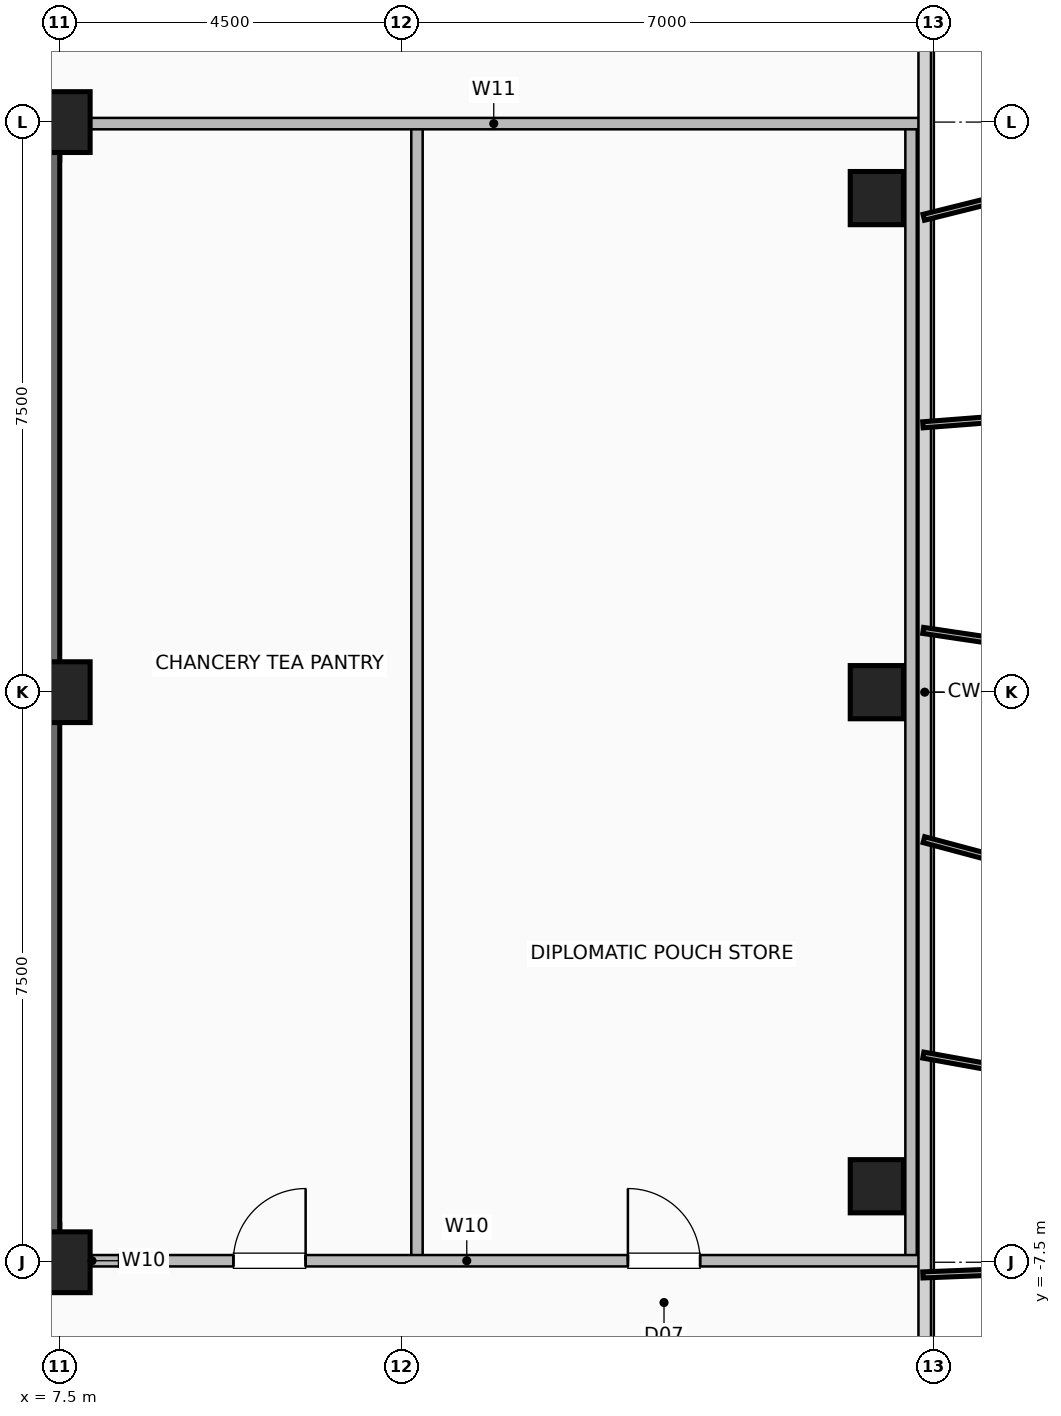
"""IFC4 building model, lengths in metres.
Left out: names, types, materials, properties, quantities, classifications, styles, units other than length and angle.
Written with IfcOpenShell. Run it as: python <this file> out.ifc"""

import sys

from ifc_helpers import new_model, si_unit, direction, frame, frame_2d, origin, origin_2d, place, context, subcontext, project, spatial, rectangle, hollow_rectangle, extrude, element, fill, save


model = new_model("IFC4")
c1 = context("Model", 3, precision=1e-05, world=origin(), true_north=direction((0.0, 1.0)))
c2 = subcontext(c1, "Body", "Model", "MODEL_VIEW")
j1 = project(units=[si_unit("LENGTHUNIT", "METRE"), si_unit("PLANEANGLEUNIT", "RADIAN")], contexts=[c1])
p1 = place(None, origin())
s1 = spatial("IfcSite", under=j1, at=p1, CompositionType="ELEMENT")
p2 = place(p1, origin())
s2 = spatial("IfcBuilding", under=s1, at=p2, CompositionType="ELEMENT")
p3 = place(p2, frame((0.0, 0.0, 239.6)))
s3 = spatial("IfcBuildingStorey", under=s2, at=p3, CompositionType="ELEMENT", Elevation=239.6)
for number, where, z_axis, x_axis in (
    (1, (7.5, -7.5, 0.0), (0.0, 0.0, 1.0), (1.0, 0.0, 0.0)),
    (2, (7.5, 0.0, 0.0), (0.0, 0.0, 1.0), (1.0, 0.0, 0.0)),
    (3, (7.5, 7.5, 0.0), (0.0, 0.0, 1.0), (1.0, 0.0, 0.0)),
):
    element("IfcColumn", number, at=place(p3, frame(where, z_axis=z_axis, x_axis=x_axis)), inside=s3, PredefinedType="COLUMN", context=c2, shape_type="SweptSolid", body=[
        extrude(hollow_rectangle(XDim=0.8, YDim=0.8, WallThickness=0.04, at=origin_2d()), origin(), (0.0, 0.0, 1.0), 3.6),
    ])
for number, where, z_axis, x_axis in (
    (4, (18.25, -6.5, 0.0), (0.0, 0.0, 1.0), (1.0, 0.0, 0.0)),
    (5, (18.25, 0.0, 0.0), (0.0, 0.0, 1.0), (1.0, 0.0, 0.0)),
    (6, (18.25, 6.5, 0.0), (0.0, 0.0, 1.0), (1.0, 0.0, 0.0)),
):
    element("IfcColumn", number, at=place(p3, frame(where, z_axis=z_axis, x_axis=x_axis)), inside=s3, PredefinedType="COLUMN", context=c2, shape_type="SweptSolid", body=[
        extrude(hollow_rectangle(XDim=0.7, YDim=0.7, WallThickness=0.035, at=origin_2d()), origin(), (0.0, 0.0, 1.0), 3.6),
    ])
p4 = place(p3, frame((-7.5, -7.25, 0.0), z_axis=(0.0, 0.0, 1.0), x_axis=(1.0, 0.0, 0.0)))
e7 = element("IfcWall", 7, at=p4, inside=s3, PredefinedType="SHEAR", context=c2, shape_type="SweptSolid", body=[
    extrude(rectangle(XDim=15.0, YDim=0.5, at=frame_2d((7.5, 0.0))), origin(), (0.0, 0.0, 1.0), 3.36),
])
p5 = place(p4, frame((1.55, 0.0, 0.0)))
e8 = element("IfcOpeningElement", 8, at=p5, cuts=e7, PredefinedType="OPENING", context=c2, shape_type="SweptSolid", body=[
    extrude(rectangle(XDim=1.05, YDim=2.08, at=frame_2d((0.525, 1.04))), frame((0.0, 0.26, 0.0), z_axis=(0.0, -1.0, 0.0), x_axis=(1.0, 0.0, 0.0)), (0.0, 0.0, 1.0), 0.52),
])
p6 = place(p4, frame((12.4, 0.0, 0.0)))
e9 = element("IfcOpeningElement", 9, at=p6, cuts=e7, PredefinedType="OPENING", context=c2, shape_type="SweptSolid", body=[
    extrude(rectangle(XDim=1.05, YDim=2.08, at=frame_2d((0.525, 1.04))), frame((0.0, 0.26, 0.0), z_axis=(0.0, -1.0, 0.0), x_axis=(1.0, 0.0, 0.0)), (0.0, 0.0, 1.0), 0.52),
])
p7 = place(p4, frame((5.2, 0.0, 0.0)))
e10 = element("IfcOpeningElement", 10, at=p7, cuts=e7, PredefinedType="OPENING", context=c2, shape_type="SweptSolid", body=[
    extrude(rectangle(XDim=1.0, YDim=2.08, at=frame_2d((0.5, 1.04))), frame((0.0, 0.26, 0.0), z_axis=(0.0, -1.0, 0.0), x_axis=(1.0, 0.0, 0.0)), (0.0, 0.0, 1.0), 0.52),
])
p8 = place(p4, frame((8.65, 0.0, 0.0)))
e11 = element("IfcOpeningElement", 11, at=p8, cuts=e7, PredefinedType="OPENING", context=c2, shape_type="SweptSolid", body=[
    extrude(rectangle(XDim=1.0, YDim=2.08, at=frame_2d((0.5, 1.04))), frame((0.0, 0.26, 0.0), z_axis=(0.0, -1.0, 0.0), x_axis=(1.0, 0.0, 0.0)), (0.0, 0.0, 1.0), 0.52),
])
for number, where, z_axis, x_axis in (
    (12, (-7.5, 7.25, 0.0), (0.0, 0.0, 1.0), (1.0, 0.0, 0.0)),
    (13, (7.25, -7.5, 0.0), (0.0, 0.0, 1.0), (0.0, 1.0, 0.0)),
):
    element("IfcWall", number, at=place(p3, frame(where, z_axis=z_axis, x_axis=x_axis)), inside=s3, PredefinedType="SHEAR", context=c2, shape_type="SweptSolid", body=[
        extrude(rectangle(XDim=15.0, YDim=0.5, at=frame_2d((7.5, 0.0))), origin(), (0.0, 0.0, 1.0), 3.36),
    ])
p9 = place(p3, frame((7.45, -7.48, 0.0), z_axis=(0.0, 0.0, 1.0), x_axis=(1.0, 0.0, 0.0)))
e14 = element("IfcWall", 14, at=p9, inside=s3, PredefinedType="PARTITIONING", context=c2, shape_type="SweptSolid", body=[
    extrude(rectangle(XDim=0.95, YDim=0.15, at=frame_2d((0.475, 0.0))), origin(), (0.0, 0.0, 1.0), 3.36),
])
for number, where, z_axis, x_axis in (
    (15, (12.2, -7.48, 0.0), (0.0, 0.0, 1.0), (0.0, 1.0, 0.0)),
    (16, (18.7, -7.48, 0.0), (0.0, 0.0, 1.0), (0.0, 1.0, 0.0)),
):
    element("IfcWall", number, at=place(p3, frame(where, z_axis=z_axis, x_axis=x_axis)), inside=s3, PredefinedType="PARTITIONING", context=c2, shape_type="SweptSolid", body=[
        extrude(rectangle(XDim=14.9, YDim=0.15, at=frame_2d((7.45, 0.0))), origin(), (0.0, 0.0, 1.0), 3.36),
    ])
p10 = place(p3, frame((8.28, -7.48, 0.0), z_axis=(0.0, 0.0, 1.0), x_axis=(1.0, 0.0, 0.0)))
e17 = element("IfcWall", 17, at=p10, inside=s3, PredefinedType="PARTITIONING", context=c2, shape_type="SweptSolid", body=[
    extrude(rectangle(XDim=10.54, YDim=0.15, at=frame_2d((5.27, 0.0))), origin(), (0.0, 0.0, 1.0), 3.36),
])
p11 = place(p10, frame((1.505, 0.0, 0.0)))
e18 = element("IfcOpeningElement", 18, at=p11, cuts=e17, PredefinedType="OPENING", context=c2, shape_type="SweptSolid", body=[
    extrude(rectangle(XDim=0.95, YDim=2.06, at=frame_2d((0.475, 1.03))), frame((0.0, 0.085, 0.0), z_axis=(0.0, -1.0, 0.0), x_axis=(1.0, 0.0, 0.0)), (0.0, 0.0, 1.0), 0.17),
])
p12 = place(p10, frame((6.695, 0.0, 0.0)))
e19 = element("IfcOpeningElement", 19, at=p12, cuts=e17, PredefinedType="OPENING", context=c2, shape_type="SweptSolid", body=[
    extrude(rectangle(XDim=0.95, YDim=2.06, at=frame_2d((0.475, 1.03))), frame((0.0, 0.085, 0.0), z_axis=(0.0, -1.0, 0.0), x_axis=(1.0, 0.0, 0.0)), (0.0, 0.0, 1.0), 0.17),
])
p13 = place(p3, frame((7.6, 7.48, 0.0), z_axis=(0.0, 0.0, 1.0), x_axis=(1.0, 0.0, 0.0)))
e20 = element("IfcWall", 20, at=p13, inside=s3, PredefinedType="PARTITIONING", context=c2, shape_type="SweptSolid", body=[
    extrude(rectangle(XDim=11.22, YDim=0.15, at=frame_2d((5.61, 0.0))), origin(), (0.0, 0.0, 1.0), 3.36),
])
p14 = place(p11, origin())
e21 = element("IfcDoor", 21, at=p14, inside=s3, OperationType="SINGLE_SWING_RIGHT", PredefinedType="DOOR", context=c2, shape_type="SweptSolid", body=[
    extrude(rectangle(XDim=0.95, YDim=2.06, at=frame_2d((0.475, 1.03))), frame((0.0, 0.025, 0.0), z_axis=(0.0, -1.0, 0.0), x_axis=(1.0, 0.0, 0.0)), (0.0, 0.0, 1.0), 0.05),
])
fill(e18, e21)
p15 = place(p12, origin())
e22 = element("IfcDoor", 22, at=p15, inside=s3, OperationType="SINGLE_SWING_LEFT", PredefinedType="DOOR", context=c2, shape_type="SweptSolid", body=[
    extrude(rectangle(XDim=0.95, YDim=2.06, at=frame_2d((0.475, 1.03))), frame((0.0, 0.025, 0.0), z_axis=(0.0, -1.0, 0.0), x_axis=(1.0, 0.0, 0.0)), (0.0, 0.0, 1.0), 0.05),
])
fill(e19, e22)
save(model, sys.argv[1])
